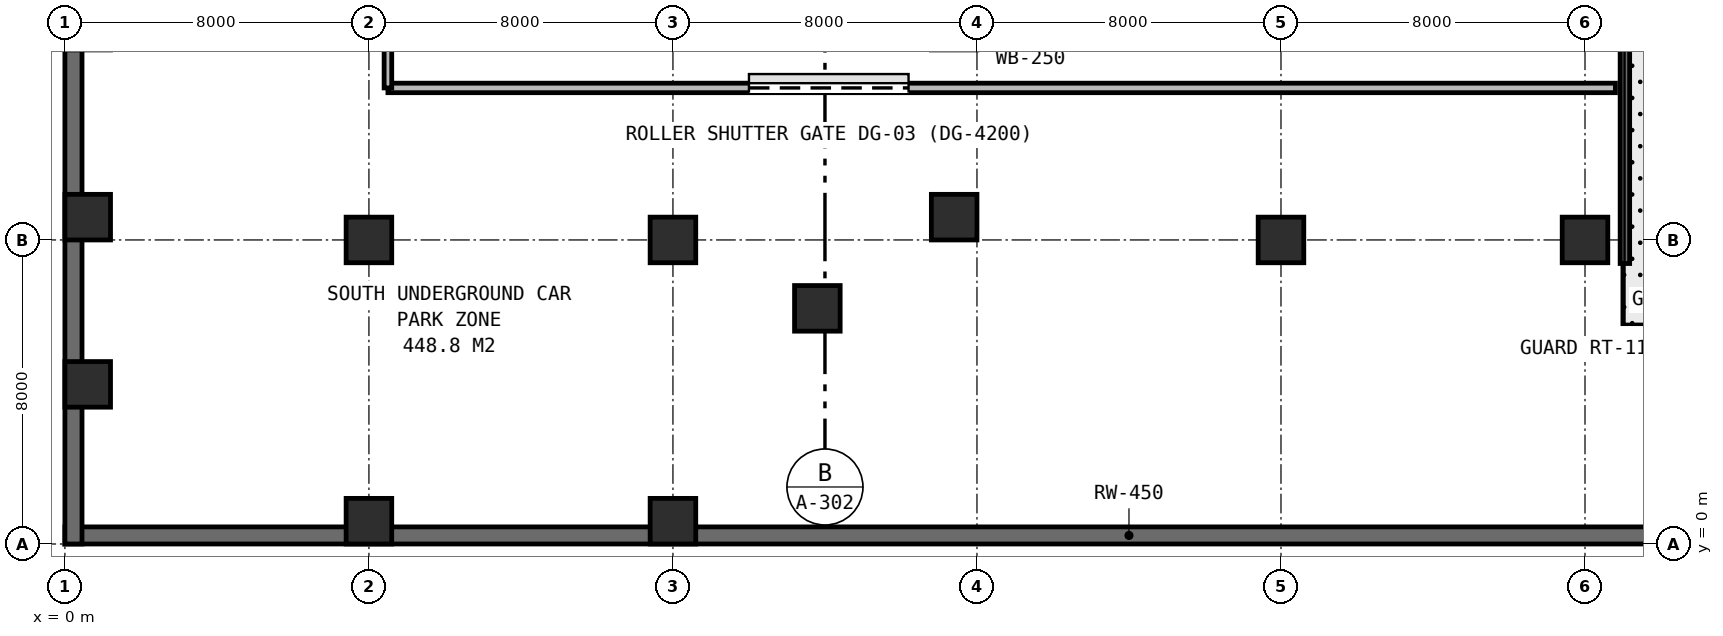
"""IFC4 building model, lengths in metres.
Left out: names, types, materials, properties, quantities, classifications, styles, units other than length and angle.
Written with IfcOpenShell. Run it as: python <this file> out.ifc"""

import sys

from ifc_helpers import new_model, si_unit, direction, frame, frame_2d, origin, origin_2d, place, context, subcontext, project, spatial, rectangle, extrude, element, fill, save


model = new_model("IFC4")
c1 = context("Model", 3, precision=1e-05, world=origin(), true_north=direction((0.0, 1.0)))
c2 = subcontext(c1, "Body", "Model", "MODEL_VIEW")
j1 = project(units=[si_unit("LENGTHUNIT", "METRE"), si_unit("PLANEANGLEUNIT", "RADIAN")], contexts=[c1])
p1 = place(None, origin())
s1 = spatial("IfcSite", under=j1, at=p1, CompositionType="ELEMENT")
p2 = place(p1, origin())
s2 = spatial("IfcBuilding", under=s1, at=p2, CompositionType="ELEMENT")
p3 = place(p2, frame((0.0, 0.0, -9.4)))
s3 = spatial("IfcBuildingStorey", under=s2, at=p3, CompositionType="ELEMENT", Elevation=-9.4)
p4 = place(p3, frame((0.0, 0.225, 0.0), z_axis=(0.0, 0.0, 1.0), x_axis=(1.0, 0.0, 0.0)))
e1 = element("IfcWall", 1, at=p4, inside=s3, PredefinedType="USERDEFINED", context=c2, shape_type="SweptSolid", body=[
    extrude(rectangle(XDim=56.0, YDim=0.45, at=frame_2d((28.0, 0.0))), origin(), (0.0, 0.0, 1.0), 3.8),
])
p5 = place(p3, frame((0.225, 0.0, 0.0), z_axis=(0.0, 0.0, 1.0), x_axis=(0.0, 1.0, 0.0)))
e2 = element("IfcWall", 2, at=p5, inside=s3, PredefinedType="USERDEFINED", context=c2, shape_type="SweptSolid", body=[
    extrude(rectangle(XDim=48.0, YDim=0.45, at=frame_2d((24.0, 0.0))), origin(), (0.0, 0.0, 1.0), 3.8),
])
for number, where, z_axis, x_axis in (
    (3, (0.6, 8.6, 0.0), (0.0, 0.0, 1.0), (1.0, 0.0, 0.0)),
    (4, (0.6, 4.2, 0.0), (0.0, 0.0, 1.0), (1.0, 0.0, 0.0)),
    (5, (8.0, 0.6, 0.0), (0.0, 0.0, 1.0), (1.0, 0.0, 0.0)),
    (6, (16.0, 0.6, 0.0), (0.0, 0.0, 1.0), (1.0, 0.0, 0.0)),
    (7, (19.8, 6.2, 0.0), (0.0, 0.0, 1.0), (1.0, 0.0, 0.0)),
    (8, (23.4, 8.6, 0.0), (0.0, 0.0, 1.0), (1.0, 0.0, 0.0)),
    (9, (8.0, 8.0, 0.0), (0.0, 0.0, 1.0), (1.0, 0.0, 0.0)),
    (10, (16.0, 8.0, 0.0), (0.0, 0.0, 1.0), (1.0, 0.0, 0.0)),
    (11, (32.0, 8.0, 0.0), (0.0, 0.0, 1.0), (1.0, 0.0, 0.0)),
    (12, (40.0, 8.0, 0.0), (0.0, 0.0, 1.0), (1.0, 0.0, 0.0)),
):
    element("IfcColumn", number, at=place(p3, frame(where, z_axis=z_axis, x_axis=x_axis)), inside=s3, PredefinedType="COLUMN", context=c2, shape_type="SweptSolid", body=[
        extrude(rectangle(XDim=1.2, YDim=1.2, at=origin_2d()), origin(), (0.0, 0.0, 1.0), 3.8),
    ])
p6 = place(p3, frame((8.5, 12.0, 0.0), z_axis=(0.0, 0.0, 1.0), x_axis=(1.0, 0.0, 0.0)))
e13 = element("IfcWall", 13, at=p6, inside=s3, PredefinedType="STANDARD", context=c2, shape_type="SweptSolid", body=[
    extrude(rectangle(XDim=32.3, YDim=0.25, at=frame_2d((16.15, 0.0))), origin(), (0.0, 0.0, 1.0), 3.15),
])
p7 = place(p6, frame((9.5, 0.0, 0.0)))
e14 = element("IfcOpeningElement", 14, at=p7, cuts=e13, PredefinedType="OPENING", context=c2, shape_type="SweptSolid", body=[
    extrude(rectangle(XDim=4.2, YDim=2.95, at=frame_2d((2.1, 1.475))), frame((0.0, 0.135, 0.0), z_axis=(0.0, -1.0, 0.0), x_axis=(1.0, 0.0, 0.0)), (0.0, 0.0, 1.0), 0.27),
])
p8 = place(p3, frame((8.5, 12.0, 0.0), z_axis=(0.0, 0.0, 1.0), x_axis=(0.0, 1.0, 0.0)))
e15 = element("IfcWall", 15, at=p8, inside=s3, PredefinedType="PARTITIONING", context=c2, shape_type="SweptSolid", body=[
    extrude(rectangle(XDim=35.45, YDim=0.2, at=frame_2d((17.725, 0.0))), origin(), (0.0, 0.0, 1.0), 2.63),
])
p9 = place(p8, frame((16.574, 0.0, 0.0)))
e16 = element("IfcOpeningElement", 16, at=p9, cuts=e15, PredefinedType="OPENING", context=c2, shape_type="SweptSolid", body=[
    extrude(rectangle(XDim=1.0, YDim=2.15, at=frame_2d((0.5, 1.075))), frame((0.0, 0.11, 0.0), z_axis=(0.0, -1.0, 0.0), x_axis=(1.0, 0.0, 0.0)), (0.0, 0.0, 1.0), 0.22),
])
p10 = place(p3, frame((41.05, 7.38, 0.0), z_axis=(0.0, 0.0, 1.0), x_axis=(0.0, 1.0, 0.0)))
e17 = element("IfcWall", 17, at=p10, inside=s3, PredefinedType="STANDARD", context=c2, shape_type="SweptSolid", body=[
    extrude(rectangle(XDim=16.48, YDim=0.25, at=frame_2d((8.24, 0.0))), origin(), (0.0, 0.0, 1.0), 3.5),
])
p11 = place(p7, origin())
e18 = element("IfcDoor", 18, at=p11, inside=s3, OperationType="ROLLINGUP", PredefinedType="GATE", context=c2, shape_type="SweptSolid", body=[
    extrude(rectangle(XDim=4.2, YDim=2.95, at=frame_2d((2.1, 1.475))), frame((0.0, 0.025, 0.0), z_axis=(0.0, -1.0, 0.0), x_axis=(1.0, 0.0, 0.0)), (0.0, 0.0, 1.0), 0.05),
])
fill(e14, e18)
save(model, sys.argv[1])
